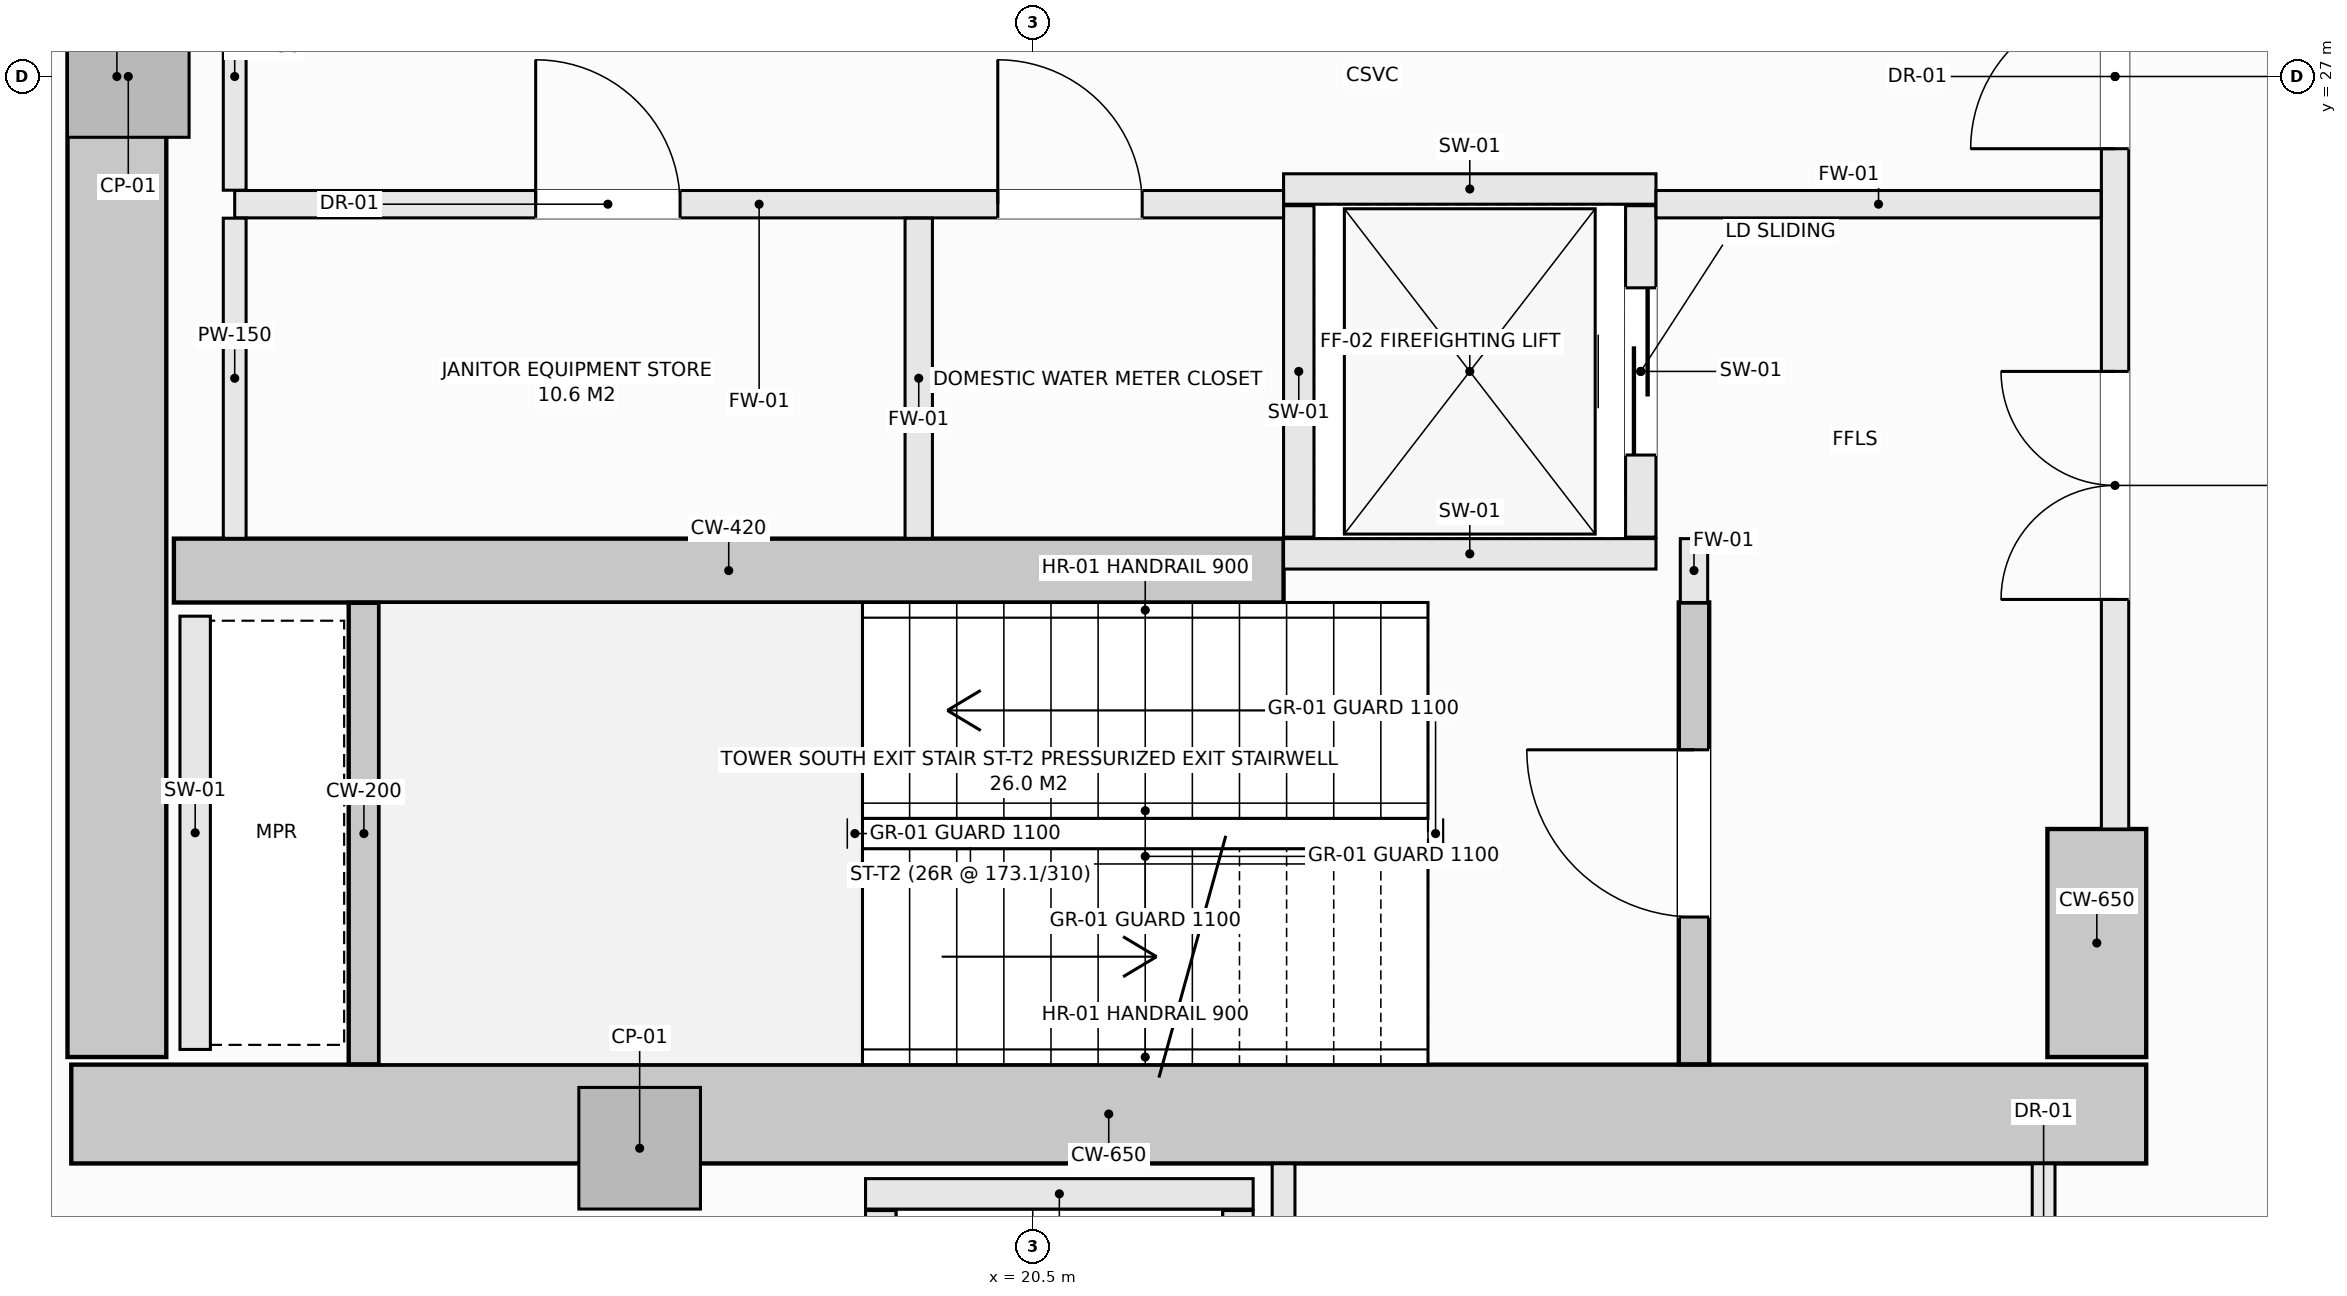
"""IFC4 building model, lengths in metres.
Left out: names, types, materials, properties, quantities, classifications, styles, units other than length and angle.
Written with IfcOpenShell. Run it as: python <this file> out.ifc"""

import sys

from ifc_helpers import new_model, si_unit, direction, frame, frame_2d, origin, origin_2d, place, context, subcontext, project, spatial, rectangle, extrude, element, fill, save


model = new_model("IFC4")
c1 = context("Model", 3, precision=1e-05, world=origin(), true_north=direction((0.0, 1.0)))
c2 = subcontext(c1, "Body", "Model", "MODEL_VIEW")
j1 = project(units=[si_unit("LENGTHUNIT", "METRE"), si_unit("PLANEANGLEUNIT", "RADIAN")], contexts=[c1])
p1 = place(None, origin())
s1 = spatial("IfcSite", under=j1, at=p1, CompositionType="ELEMENT")
p2 = place(p1, origin())
s2 = spatial("IfcBuilding", under=s1, at=p2, CompositionType="ELEMENT")
p3 = place(p2, frame((0.0, 0.0, 100.8)))
s3 = spatial("IfcBuildingStorey", under=s2, at=p3, CompositionType="ELEMENT", Elevation=100.8)
p4 = place(p3, frame((14.175, 20.175, -0.28), z_axis=(0.0, 0.0, 1.0), x_axis=(1.0, 0.0, 0.0)))
e1 = element("IfcWall", 1, at=p4, inside=s3, PredefinedType="SHEAR", context=c2, shape_type="SweptSolid", body=[
    extrude(rectangle(XDim=13.65, YDim=0.65, at=frame_2d((6.825, 0.0))), origin(), (0.0, 0.0, 1.0), 4.51),
])
p5 = place(p3, frame((14.475, 20.55, -0.28), z_axis=(0.0, 0.0, 1.0), x_axis=(0.0, 1.0, 0.0)))
e2 = element("IfcWall", 2, at=p5, inside=s3, PredefinedType="SHEAR", context=c2, shape_type="SweptSolid", body=[
    extrude(rectangle(XDim=12.9, YDim=0.65, at=frame_2d((6.45, 0.0))), origin(), (0.0, 0.0, 1.0), 4.51),
])
p6 = place(p3, frame((27.5, 20.55, -0.28), z_axis=(0.0, 0.0, 1.0), x_axis=(0.0, 1.0, 0.0)))
e3 = element("IfcWall", 3, at=p6, inside=s3, PredefinedType="SHEAR", context=c2, shape_type="SweptSolid", body=[
    extrude(rectangle(XDim=1.5, YDim=0.65, at=frame_2d((0.75, 0.0))), origin(), (0.0, 0.0, 1.0), 4.51),
])
p7 = place(p3, frame((14.85, 23.75, -0.28), z_axis=(0.0, 0.0, 1.0), x_axis=(1.0, 0.0, 0.0)))
e4 = element("IfcWall", 4, at=p7, inside=s3, PredefinedType="SHEAR", context=c2, shape_type="SweptSolid", body=[
    extrude(rectangle(XDim=7.3, YDim=0.42, at=frame_2d((3.65, 0.0))), origin(), (0.0, 0.0, 1.0), 4.51),
])
for number, where, z_axis, x_axis in (
    (5, (14.55, 27.0, -0.28), (0.0, 0.0, 1.0), (1.0, 0.0, 0.0)),
    (6, (17.914, 19.95, -0.28), (0.0, 0.0, 1.0), (1.0, 0.0, 0.0)),
):
    element("IfcColumn", number, at=place(p3, frame(where, z_axis=z_axis, x_axis=x_axis)), inside=s3, PredefinedType="PILASTER", context=c2, shape_type="SweptSolid", body=[
        extrude(rectangle(XDim=0.8, YDim=0.8, at=origin_2d()), origin(), (0.0, 0.0, 1.0), 4.51),
    ])
p8 = place(p3, frame((24.85, 20.502, -0.28), z_axis=(0.0, 0.0, 1.0), x_axis=(0.0, 1.0, 0.0)))
e7 = element("IfcWall", 7, at=p8, inside=s3, PredefinedType="SHEAR", context=c2, shape_type="SweptSolid", body=[
    extrude(rectangle(XDim=3.038, YDim=0.2, at=frame_2d((1.519, 0.0))), origin(), (0.0, 0.0, 1.0), 4.51),
])
p9 = place(p8, frame((0.969, 0.0, 0.28)))
e8 = element("IfcOpeningElement", 8, at=p9, cuts=e7, PredefinedType="OPENING", context=c2, shape_type="SweptSolid", body=[
    extrude(rectangle(XDim=1.1, YDim=2.15, at=frame_2d((0.55, 1.075))), frame((0.0, 0.11, 0.0), z_axis=(0.0, -1.0, 0.0), x_axis=(1.0, 0.0, 0.0)), (0.0, 0.0, 1.0), 0.22),
])
p10 = place(p3, frame((16.1, 20.502, -0.28), z_axis=(0.0, 0.0, 1.0), x_axis=(0.0, 1.0, 0.0)))
e9 = element("IfcWall", 9, at=p10, inside=s3, PredefinedType="SHEAR", context=c2, shape_type="SweptSolid", body=[
    extrude(rectangle(XDim=3.036, YDim=0.2, at=frame_2d((1.518, 0.0))), origin(), (0.0, 0.0, 1.0), 4.51),
])
for number, where, z_axis, x_axis in (
    (10, (22.15, 26.26, 0.0), (0.0, 0.0, 1.0), (1.0, 0.0, 0.0)),
    (11, (22.15, 23.86, 0.0), (0.0, 0.0, 1.0), (1.0, 0.0, 0.0)),
):
    element("IfcWall", number, at=place(p3, frame(where, z_axis=z_axis, x_axis=x_axis)), inside=s3, PredefinedType="SOLIDWALL", context=c2, shape_type="SweptSolid", body=[
        extrude(rectangle(XDim=2.45, YDim=0.2, at=frame_2d((1.225, 0.0))), origin(), (0.0, 0.0, 1.0), 4.23),
    ])
p11 = place(p3, frame((22.25, 23.97, 0.0), z_axis=(0.0, 0.0, 1.0), x_axis=(0.0, 1.0, 0.0)))
e12 = element("IfcWall", 12, at=p11, inside=s3, PredefinedType="SOLIDWALL", context=c2, shape_type="SweptSolid", body=[
    extrude(rectangle(XDim=2.18, YDim=0.2, at=frame_2d((1.09, 0.0))), origin(), (0.0, 0.0, 1.0), 4.23),
])
p12 = place(p3, frame((24.5, 23.97, 0.0), z_axis=(0.0, 0.0, 1.0), x_axis=(0.0, 1.0, 0.0)))
e13 = element("IfcWall", 13, at=p12, inside=s3, PredefinedType="SOLIDWALL", context=c2, shape_type="SweptSolid", body=[
    extrude(rectangle(XDim=2.18, YDim=0.2, at=frame_2d((1.09, 0.0))), origin(), (0.0, 0.0, 1.0), 4.23),
])
p13 = place(p12, frame((0.54, 0.0, 0.0)))
e14 = element("IfcOpeningElement", 14, at=p13, cuts=e13, PredefinedType="OPENING", context=c2, shape_type="SweptSolid", body=[
    extrude(rectangle(XDim=1.1, YDim=2.2, at=frame_2d((0.55, 1.1))), frame((0.0, 0.11, 0.0), z_axis=(0.0, -1.0, 0.0), x_axis=(1.0, 0.0, 0.0)), (0.0, 0.0, 1.0), 0.22),
])
p14 = place(p3, frame((19.4, 19.65, 0.0), z_axis=(0.0, 0.0, 1.0), x_axis=(1.0, 0.0, 0.0)))
e15 = element("IfcWall", 15, at=p14, inside=s3, PredefinedType="SOLIDWALL", context=c2, shape_type="SweptSolid", body=[
    extrude(rectangle(XDim=2.55, YDim=0.2, at=frame_2d((1.275, 0.0))), origin(), (0.0, 0.0, 1.0), 4.23),
])
for number, where, z_axis, x_axis in (
    (16, (19.5, 17.01, 0.0), (0.0, 0.0, 1.0), (0.0, 1.0, 0.0)),
    (17, (21.85, 17.01, 0.0), (0.0, 0.0, 1.0), (0.0, 1.0, 0.0)),
):
    element("IfcWall", number, at=place(p3, frame(where, z_axis=z_axis, x_axis=x_axis)), inside=s3, PredefinedType="SOLIDWALL", context=c2, shape_type="SweptSolid", body=[
        extrude(rectangle(XDim=2.53, YDim=0.2, at=frame_2d((1.265, 0.0))), origin(), (0.0, 0.0, 1.0), 4.23),
    ])
p15 = place(p3, frame((14.99, 20.6, 0.0), z_axis=(0.0, 0.0, 1.0), x_axis=(0.0, 1.0, 0.0)))
e18 = element("IfcWall", 18, at=p15, inside=s3, PredefinedType="SOLIDWALL", context=c2, shape_type="SweptSolid", body=[
    extrude(rectangle(XDim=2.85, YDim=0.2, at=frame_2d((1.425, 0.0))), origin(), (0.0, 0.0, 1.0), 4.23),
])
p16 = place(p3, frame((24.85, 23.54, 0.0), z_axis=(0.0, 0.0, 1.0), x_axis=(0.0, 1.0, 0.0)))
e19 = element("IfcWall", 19, at=p16, inside=s3, PredefinedType="SOLIDWALL", context=c2, shape_type="SweptSolid", body=[
    extrude(rectangle(XDim=0.42, YDim=0.18, at=frame_2d((0.21, 0.0))), origin(), (0.0, 0.0, 1.0), 4.23),
])
p17 = place(p3, frame((27.62, 22.05, 0.0), z_axis=(0.0, 0.0, 1.0), x_axis=(0.0, 1.0, 0.0)))
e20 = element("IfcWall", 20, at=p17, inside=s3, PredefinedType="SOLIDWALL", context=c2, shape_type="SweptSolid", body=[
    extrude(rectangle(XDim=9.9, YDim=0.18, at=frame_2d((4.95, 0.0))), origin(), (0.0, 0.0, 1.0), 3.322),
])
p18 = place(p17, frame((4.475, 0.0, 0.0)))
e21 = element("IfcOpeningElement", 21, at=p18, cuts=e20, PredefinedType="OPENING", context=c2, shape_type="SweptSolid", body=[
    extrude(rectangle(XDim=0.95, YDim=2.1, at=frame_2d((0.475, 1.05))), frame((0.0, 0.1, 0.0), z_axis=(0.0, -1.0, 0.0), x_axis=(1.0, 0.0, 0.0)), (0.0, 0.0, 1.0), 0.2),
])
p19 = place(p17, frame((6.89, 0.0, 0.0)))
e22 = element("IfcOpeningElement", 22, at=p19, cuts=e20, PredefinedType="OPENING", context=c2, shape_type="SweptSolid", body=[
    extrude(rectangle(XDim=1.5, YDim=2.2, at=frame_2d((0.75, 1.1))), frame((0.0, 0.1, 0.0), z_axis=(0.0, -1.0, 0.0), x_axis=(1.0, 0.0, 0.0)), (0.0, 0.0, 1.0), 0.2),
])
p20 = place(p17, frame((1.51, 0.0, 0.0)))
e23 = element("IfcOpeningElement", 23, at=p20, cuts=e20, PredefinedType="OPENING", context=c2, shape_type="SweptSolid", body=[
    extrude(rectangle(XDim=1.5, YDim=2.2, at=frame_2d((0.75, 1.1))), frame((0.0, 0.1, 0.0), z_axis=(0.0, -1.0, 0.0), x_axis=(1.0, 0.0, 0.0)), (0.0, 0.0, 1.0), 0.2),
])
p21 = place(p3, frame((15.25, 26.16, 0.0), z_axis=(0.0, 0.0, 1.0), x_axis=(1.0, 0.0, 0.0)))
e24 = element("IfcWall", 24, at=p21, inside=s3, PredefinedType="SOLIDWALL", context=c2, shape_type="SweptSolid", body=[
    extrude(rectangle(XDim=6.9, YDim=0.18, at=frame_2d((3.45, 0.0))), origin(), (0.0, 0.0, 1.0), 4.23),
])
p22 = place(p21, frame((5.02, 0.0, 0.0)))
e25 = element("IfcOpeningElement", 25, at=p22, cuts=e24, PredefinedType="OPENING", context=c2, shape_type="SweptSolid", body=[
    extrude(rectangle(XDim=0.95, YDim=2.1, at=frame_2d((0.475, 1.05))), frame((0.0, 0.1, 0.0), z_axis=(0.0, -1.0, 0.0), x_axis=(1.0, 0.0, 0.0)), (0.0, 0.0, 1.0), 0.2),
])
p23 = place(p21, frame((1.98, 0.0, 0.0)))
e26 = element("IfcOpeningElement", 26, at=p23, cuts=e24, PredefinedType="OPENING", context=c2, shape_type="SweptSolid", body=[
    extrude(rectangle(XDim=0.95, YDim=2.1, at=frame_2d((0.475, 1.05))), frame((0.0, 0.1, 0.0), z_axis=(0.0, -1.0, 0.0), x_axis=(1.0, 0.0, 0.0)), (0.0, 0.0, 1.0), 0.2),
])
p24 = place(p3, frame((24.6, 26.16, 0.0), z_axis=(0.0, 0.0, 1.0), x_axis=(1.0, 0.0, 0.0)))
e27 = element("IfcWall", 27, at=p24, inside=s3, PredefinedType="SOLIDWALL", context=c2, shape_type="SweptSolid", body=[
    extrude(rectangle(XDim=2.928, YDim=0.18, at=frame_2d((1.464, 0.0))), origin(), (0.0, 0.0, 1.0), 4.23),
])
p25 = place(p3, frame((15.25, 23.962, 0.0), z_axis=(0.0, 0.0, 1.0), x_axis=(0.0, 1.0, 0.0)))
e28 = element("IfcWall", 28, at=p25, inside=s3, PredefinedType="PARTITIONING", context=c2, shape_type="SweptSolid", body=[
    extrude(rectangle(XDim=2.106, YDim=0.15, at=frame_2d((1.053, 0.0))), origin(), (0.0, 0.0, 1.0), 4.23),
])
p26 = place(p3, frame((15.25, 26.252, 0.0), z_axis=(0.0, 0.0, 1.0), x_axis=(0.0, 1.0, 0.0)))
e29 = element("IfcWall", 29, at=p26, inside=s3, PredefinedType="PARTITIONING", context=c2, shape_type="SweptSolid", body=[
    extrude(rectangle(XDim=1.496, YDim=0.15, at=frame_2d((0.748, 0.0))), origin(), (0.0, 0.0, 1.0), 4.23),
])
p27 = place(p3, frame((19.75, 23.962, 0.0), z_axis=(0.0, 0.0, 1.0), x_axis=(0.0, 1.0, 0.0)))
e30 = element("IfcWall", 30, at=p27, inside=s3, PredefinedType="SOLIDWALL", context=c2, shape_type="SweptSolid", body=[
    extrude(rectangle(XDim=2.106, YDim=0.18, at=frame_2d((1.053, 0.0))), origin(), (0.0, 0.0, 1.0), 4.23),
])
p28 = place(p3, frame((22.15, 17.127, 0.0), z_axis=(0.0, 0.0, 1.0), x_axis=(0.0, 1.0, 0.0)))
e31 = element("IfcWall", 31, at=p28, inside=s3, PredefinedType="PARTITIONING", context=c2, shape_type="SweptSolid", body=[
    extrude(rectangle(XDim=2.721, YDim=0.15, at=frame_2d((1.36, 0.0))), origin(), (0.0, 0.0, 1.0), 4.23),
])
p29 = place(p3, frame((27.15, 17.127, 0.0), z_axis=(0.0, 0.0, 1.0), x_axis=(0.0, 1.0, 0.0)))
e32 = element("IfcWall", 32, at=p29, inside=s3, PredefinedType="PARTITIONING", context=c2, shape_type="SweptSolid", body=[
    extrude(rectangle(XDim=2.721, YDim=0.15, at=frame_2d((1.36, 0.0))), origin(), (0.0, 0.0, 1.0), 4.23),
])
p30 = place(p29, frame((0.885, 0.0, 0.0)))
e33 = element("IfcOpeningElement", 33, at=p30, cuts=e32, PredefinedType="OPENING", context=c2, shape_type="SweptSolid", body=[
    extrude(rectangle(XDim=0.95, YDim=2.1, at=frame_2d((0.475, 1.05))), frame((0.0, 0.085, 0.0), z_axis=(0.0, -1.0, 0.0), x_axis=(1.0, 0.0, 0.0)), (0.0, 0.0, 1.0), 0.17),
])
p31 = place(p9, origin())
e34 = element("IfcDoor", 34, at=p31, inside=s3, OperationType="SINGLE_SWING_RIGHT", PredefinedType="DOOR", context=c2, shape_type="SweptSolid", body=[
    extrude(rectangle(XDim=1.1, YDim=2.15, at=frame_2d((0.55, 1.075))), frame((0.0, 0.025, 0.0), z_axis=(0.0, -1.0, 0.0), x_axis=(1.0, 0.0, 0.0)), (0.0, 0.0, 1.0), 0.05),
])
fill(e8, e34)
p32 = place(p13, origin())
e35 = element("IfcDoor", 35, at=p32, inside=s3, OperationType="SLIDING_TO_LEFT", PredefinedType="DOOR", context=c2, shape_type="SweptSolid", body=[
    extrude(rectangle(XDim=1.1, YDim=2.2, at=frame_2d((0.55, 1.1))), frame((0.0, 0.025, 0.0), z_axis=(0.0, -1.0, 0.0), x_axis=(1.0, 0.0, 0.0)), (0.0, 0.0, 1.0), 0.05),
])
fill(e14, e35)
p33 = place(p18, origin())
e36 = element("IfcDoor", 36, at=p33, inside=s3, OperationType="SINGLE_SWING_LEFT", PredefinedType="DOOR", context=c2, shape_type="SweptSolid", body=[
    extrude(rectangle(XDim=0.95, YDim=2.1, at=frame_2d((0.475, 1.05))), frame((0.0, 0.025, 0.0), z_axis=(0.0, -1.0, 0.0), x_axis=(1.0, 0.0, 0.0)), (0.0, 0.0, 1.0), 0.05),
])
fill(e21, e36)
p34 = place(p20, origin())
e37 = element("IfcDoor", 37, at=p34, inside=s3, OperationType="DOUBLE_DOOR_SINGLE_SWING", PredefinedType="DOOR", context=c2, shape_type="SweptSolid", body=[
    extrude(rectangle(XDim=1.5, YDim=2.2, at=frame_2d((0.75, 1.1))), frame((0.0, 0.025, 0.0), z_axis=(0.0, -1.0, 0.0), x_axis=(1.0, 0.0, 0.0)), (0.0, 0.0, 1.0), 0.05),
])
fill(e23, e37)
p35 = place(p22, origin())
e38 = element("IfcDoor", 38, at=p35, inside=s3, OperationType="SINGLE_SWING_LEFT", PredefinedType="DOOR", context=c2, shape_type="SweptSolid", body=[
    extrude(rectangle(XDim=0.95, YDim=2.1, at=frame_2d((0.475, 1.05))), frame((0.0, 0.025, 0.0), z_axis=(0.0, -1.0, 0.0), x_axis=(1.0, 0.0, 0.0)), (0.0, 0.0, 1.0), 0.05),
])
fill(e25, e38)
p36 = place(p23, origin())
e39 = element("IfcDoor", 39, at=p36, inside=s3, OperationType="SINGLE_SWING_LEFT", PredefinedType="DOOR", context=c2, shape_type="SweptSolid", body=[
    extrude(rectangle(XDim=0.95, YDim=2.1, at=frame_2d((0.475, 1.05))), frame((0.0, 0.025, 0.0), z_axis=(0.0, -1.0, 0.0), x_axis=(1.0, 0.0, 0.0)), (0.0, 0.0, 1.0), 0.05),
])
fill(e26, e39)
save(model, sys.argv[1])
